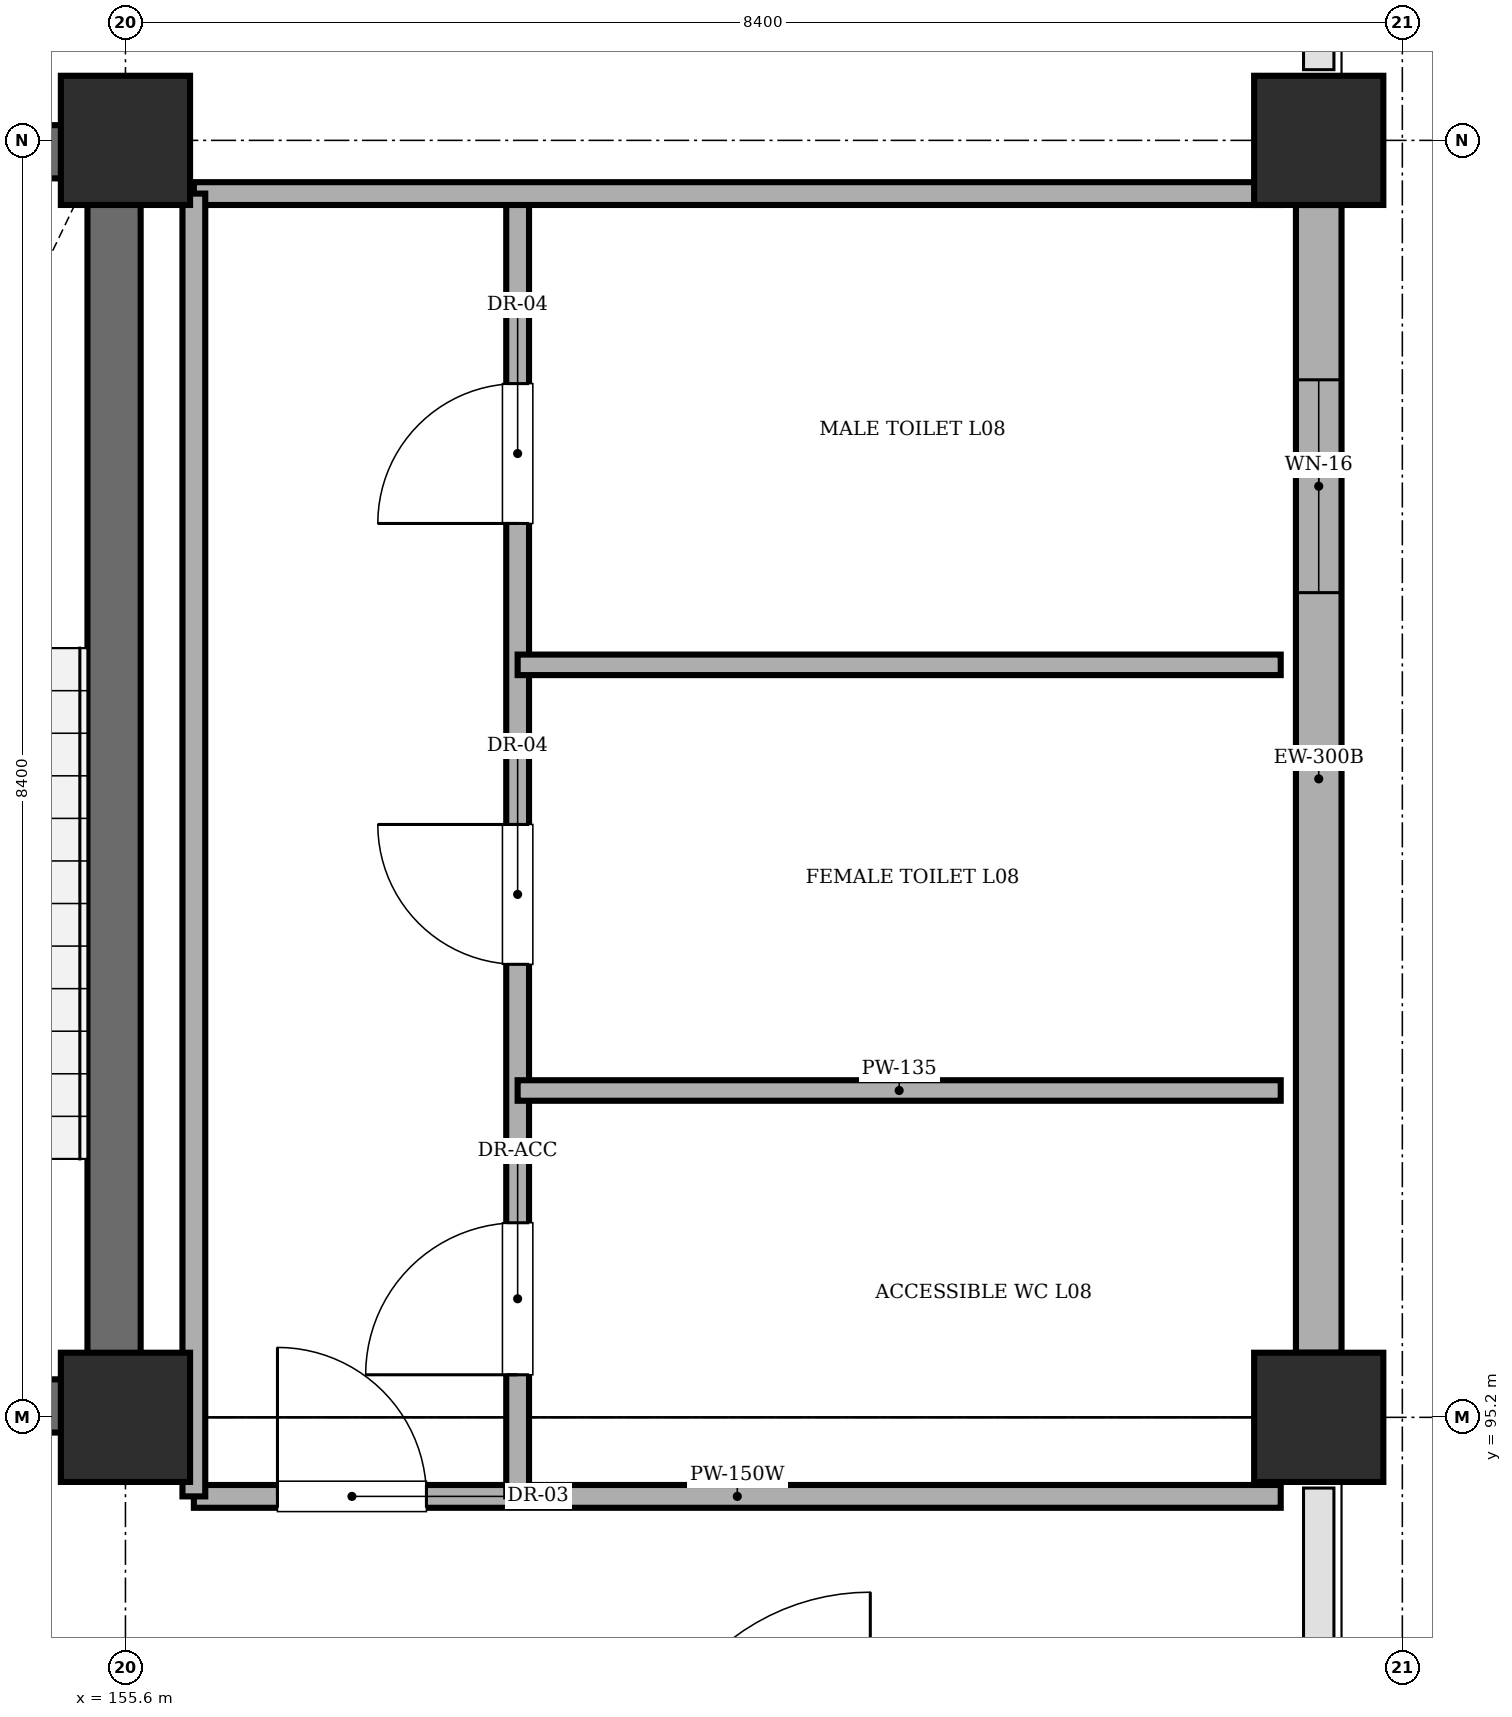
"""IFC4 building model, lengths in metres.
Left out: names, types, materials, properties, quantities, classifications, styles, units other than length and angle.
Written with IfcOpenShell. Run it as: python <this file> out.ifc"""

import sys

from ifc_helpers import new_model, si_unit, direction, frame, frame_2d, origin, origin_2d, place, context, subcontext, project, spatial, rectangle, extrude, element, fill, save


model = new_model("IFC4")
c1 = context("Model", 3, precision=1e-05, world=origin(), true_north=direction((0.0, 1.0)))
c2 = subcontext(c1, "Body", "Model", "MODEL_VIEW")
j1 = project(units=[si_unit("LENGTHUNIT", "METRE"), si_unit("PLANEANGLEUNIT", "RADIAN")], contexts=[c1])
p1 = place(None, origin())
s1 = spatial("IfcSite", under=j1, at=p1, CompositionType="ELEMENT")
p2 = place(p1, origin())
s2 = spatial("IfcBuilding", under=s1, at=p2, CompositionType="ELEMENT")
p3 = place(p2, frame((0.0, 0.0, 31.8)))
s3 = spatial("IfcBuildingStorey", under=s2, at=p3, CompositionType="ELEMENT", Elevation=31.8)
for number, where, z_axis, x_axis in (
    (1, (155.6, 95.2, 0.0), (0.0, 0.0, 1.0), (1.0, 0.0, 0.0)),
    (2, (155.6, 103.6, 0.0), (0.0, 0.0, 1.0), (1.0, 0.0, 0.0)),
    (3, (163.45, 95.2, 0.0), (0.0, 0.0, 1.0), (1.0, 0.0, 0.0)),
    (4, (163.45, 103.6, 0.0), (0.0, 0.0, 1.0), (1.0, 0.0, 0.0)),
):
    element("IfcColumn", number, at=place(p3, frame(where, z_axis=z_axis, x_axis=x_axis)), inside=s3, PredefinedType="COLUMN", context=c2, shape_type="SweptSolid", body=[
        extrude(rectangle(XDim=0.85, YDim=0.85, at=origin_2d()), origin(), (0.0, 0.0, 1.0), 4.02),
    ])
for number, where, z_axis, x_axis in (
    (5, (151.9, 95.275, 0.0), (0.0, 0.0, 1.0), (1.0, 0.0, 0.0)),
    (6, (151.9, 103.525, 0.0), (0.0, 0.0, 1.0), (1.0, 0.0, 0.0)),
):
    element("IfcWall", number, at=place(p3, frame(where, z_axis=z_axis, x_axis=x_axis)), inside=s3, PredefinedType="SHEAR", context=c2, shape_type="SweptSolid", body=[
        extrude(rectangle(XDim=3.8, YDim=0.35, at=frame_2d((1.9, 0.0))), origin(), (0.0, 0.0, 1.0), 4.02),
    ])
p4 = place(p3, frame((155.525, 95.45, 0.0), z_axis=(0.0, 0.0, 1.0), x_axis=(0.0, 1.0, 0.0)))
e7 = element("IfcWall", 7, at=p4, inside=s3, PredefinedType="SHEAR", context=c2, shape_type="SweptSolid", body=[
    extrude(rectangle(XDim=7.9, YDim=0.35, at=frame_2d((3.95, 0.0))), origin(), (0.0, 0.0, 1.0), 4.02),
])
p5 = place(p3, frame((163.45, 103.175, 0.0), z_axis=(0.0, 0.0, 1.0), x_axis=(0.0, -1.0, 0.0)))
e8 = element("IfcWall", 8, at=p5, inside=s3, PredefinedType="STANDARD", context=c2, shape_type="SweptSolid", body=[
    extrude(rectangle(XDim=7.55, YDim=0.3, at=frame_2d((3.775, 0.0))), origin(), (0.0, 0.0, 1.0), 3.32),
])
p6 = place(p5, frame((1.15, 0.0, 1.1)))
e9 = element("IfcOpeningElement", 9, at=p6, cuts=e8, PredefinedType="OPENING", context=c2, shape_type="SweptSolid", body=[
    extrude(rectangle(XDim=1.4, YDim=1.4, at=frame_2d((0.7, 0.7))), frame((0.0, 0.16, 0.0), z_axis=(0.0, -1.0, 0.0), x_axis=(1.0, 0.0, 0.0)), (0.0, 0.0, 1.0), 0.32),
])
p7 = place(p3, frame((156.05, 94.68, 0.0), z_axis=(0.0, 0.0, 1.0), x_axis=(1.0, 0.0, 0.0)))
e10 = element("IfcWall", 10, at=p7, inside=s3, PredefinedType="PARTITIONING", context=c2, shape_type="SweptSolid", body=[
    extrude(rectangle(XDim=7.15, YDim=0.15, at=frame_2d((3.575, 0.0))), origin(), (0.0, 0.0, 1.0), 4.02),
])
p8 = place(p7, frame((0.55, 0.0, 0.0)))
e11 = element("IfcOpeningElement", 11, at=p8, cuts=e10, PredefinedType="OPENING", context=c2, shape_type="SweptSolid", body=[
    extrude(rectangle(XDim=0.98, YDim=2.12, at=frame_2d((0.49, 1.06))), frame((0.0, 0.085, 0.0), z_axis=(0.0, -1.0, 0.0), x_axis=(1.0, 0.0, 0.0)), (0.0, 0.0, 1.0), 0.17),
])
p9 = place(p3, frame((158.18, 94.68, 0.0), z_axis=(0.0, 0.0, 1.0), x_axis=(0.0, 1.0, 0.0)))
e12 = element("IfcWall", 12, at=p9, inside=s3, PredefinedType="PARTITIONING", context=c2, shape_type="SweptSolid", body=[
    extrude(rectangle(XDim=8.57, YDim=0.15, at=frame_2d((4.285, 0.0))), origin(), (0.0, 0.0, 1.0), 4.02),
])
p10 = place(p9, frame((0.8, 0.0, 0.0)))
e13 = element("IfcOpeningElement", 13, at=p10, cuts=e12, PredefinedType="OPENING", context=c2, shape_type="SweptSolid", body=[
    extrude(rectangle(XDim=1.0, YDim=2.12, at=frame_2d((0.5, 1.06))), frame((0.0, 0.085, 0.0), z_axis=(0.0, -1.0, 0.0), x_axis=(1.0, 0.0, 0.0)), (0.0, 0.0, 1.0), 0.17),
])
p11 = place(p9, frame((3.5, 0.0, 0.0)))
e14 = element("IfcOpeningElement", 14, at=p11, cuts=e12, PredefinedType="OPENING", context=c2, shape_type="SweptSolid", body=[
    extrude(rectangle(XDim=0.92, YDim=2.1, at=frame_2d((0.46, 1.05))), frame((0.0, 0.085, 0.0), z_axis=(0.0, -1.0, 0.0), x_axis=(1.0, 0.0, 0.0)), (0.0, 0.0, 1.0), 0.17),
])
p12 = place(p9, frame((6.4, 0.0, 0.0)))
e15 = element("IfcOpeningElement", 15, at=p12, cuts=e12, PredefinedType="OPENING", context=c2, shape_type="SweptSolid", body=[
    extrude(rectangle(XDim=0.92, YDim=2.1, at=frame_2d((0.46, 1.05))), frame((0.0, 0.085, 0.0), z_axis=(0.0, -1.0, 0.0), x_axis=(1.0, 0.0, 0.0)), (0.0, 0.0, 1.0), 0.17),
])
for number, where, z_axis, x_axis in (
    (16, (158.18, 97.35, 0.0), (0.0, 0.0, 1.0), (1.0, 0.0, 0.0)),
    (17, (158.18, 100.15, 0.0), (0.0, 0.0, 1.0), (1.0, 0.0, 0.0)),
):
    element("IfcWall", number, at=place(p3, frame(where, z_axis=z_axis, x_axis=x_axis)), inside=s3, PredefinedType="PARTITIONING", context=c2, shape_type="SweptSolid", body=[
        extrude(rectangle(XDim=5.02, YDim=0.135, at=frame_2d((2.51, 0.0))), origin(), (0.0, 0.0, 1.0), 4.02),
    ])
p13 = place(p3, frame((156.05, 103.25, 0.0), z_axis=(0.0, 0.0, 1.0), x_axis=(1.0, 0.0, 0.0)))
e18 = element("IfcWall", 18, at=p13, inside=s3, PredefinedType="PARTITIONING", context=c2, shape_type="SweptSolid", body=[
    extrude(rectangle(XDim=7.15, YDim=0.15, at=frame_2d((3.575, 0.0))), origin(), (0.0, 0.0, 1.0), 4.02),
])
p14 = place(p3, frame((156.05, 94.68, 0.0), z_axis=(0.0, 0.0, 1.0), x_axis=(0.0, 1.0, 0.0)))
e19 = element("IfcWall", 19, at=p14, inside=s3, PredefinedType="PARTITIONING", context=c2, shape_type="SweptSolid", body=[
    extrude(rectangle(XDim=8.57, YDim=0.15, at=frame_2d((4.285, 0.0))), origin(), (0.0, 0.0, 1.0), 4.02),
])
p15 = place(p6, origin())
e20 = element("IfcWindow", 20, at=p15, inside=s3, PartitioningType="SINGLE_PANEL", PredefinedType="WINDOW", context=c2, shape_type="SweptSolid", body=[
    extrude(rectangle(XDim=1.4, YDim=1.4, at=frame_2d((0.7, 0.7))), frame((0.0, 0.03, 0.0), z_axis=(0.0, -1.0, 0.0), x_axis=(1.0, 0.0, 0.0)), (0.0, 0.0, 1.0), 0.06),
])
fill(e9, e20)
p16 = place(p8, origin())
e21 = element("IfcDoor", 21, at=p16, inside=s3, OperationType="SINGLE_SWING_LEFT", PredefinedType="DOOR", context=c2, shape_type="SweptSolid", body=[
    extrude(rectangle(XDim=0.98, YDim=2.12, at=frame_2d((0.49, 1.06))), frame((0.0, 0.025, 0.0), z_axis=(0.0, -1.0, 0.0), x_axis=(1.0, 0.0, 0.0)), (0.0, 0.0, 1.0), 0.05),
])
fill(e11, e21)
p17 = place(p10, origin())
e22 = element("IfcDoor", 22, at=p17, inside=s3, OperationType="SINGLE_SWING_LEFT", PredefinedType="DOOR", context=c2, shape_type="SweptSolid", body=[
    extrude(rectangle(XDim=1.0, YDim=2.12, at=frame_2d((0.5, 1.06))), frame((0.0, 0.025, 0.0), z_axis=(0.0, -1.0, 0.0), x_axis=(1.0, 0.0, 0.0)), (0.0, 0.0, 1.0), 0.05),
])
fill(e13, e22)
p18 = place(p11, origin())
e23 = element("IfcDoor", 23, at=p18, inside=s3, OperationType="SINGLE_SWING_RIGHT", PredefinedType="DOOR", context=c2, shape_type="SweptSolid", body=[
    extrude(rectangle(XDim=0.92, YDim=2.1, at=frame_2d((0.46, 1.05))), frame((0.0, 0.025, 0.0), z_axis=(0.0, -1.0, 0.0), x_axis=(1.0, 0.0, 0.0)), (0.0, 0.0, 1.0), 0.05),
])
fill(e14, e23)
p19 = place(p12, origin())
e24 = element("IfcDoor", 24, at=p19, inside=s3, OperationType="SINGLE_SWING_LEFT", PredefinedType="DOOR", context=c2, shape_type="SweptSolid", body=[
    extrude(rectangle(XDim=0.92, YDim=2.1, at=frame_2d((0.46, 1.05))), frame((0.0, 0.025, 0.0), z_axis=(0.0, -1.0, 0.0), x_axis=(1.0, 0.0, 0.0)), (0.0, 0.0, 1.0), 0.05),
])
fill(e15, e24)
save(model, sys.argv[1])
